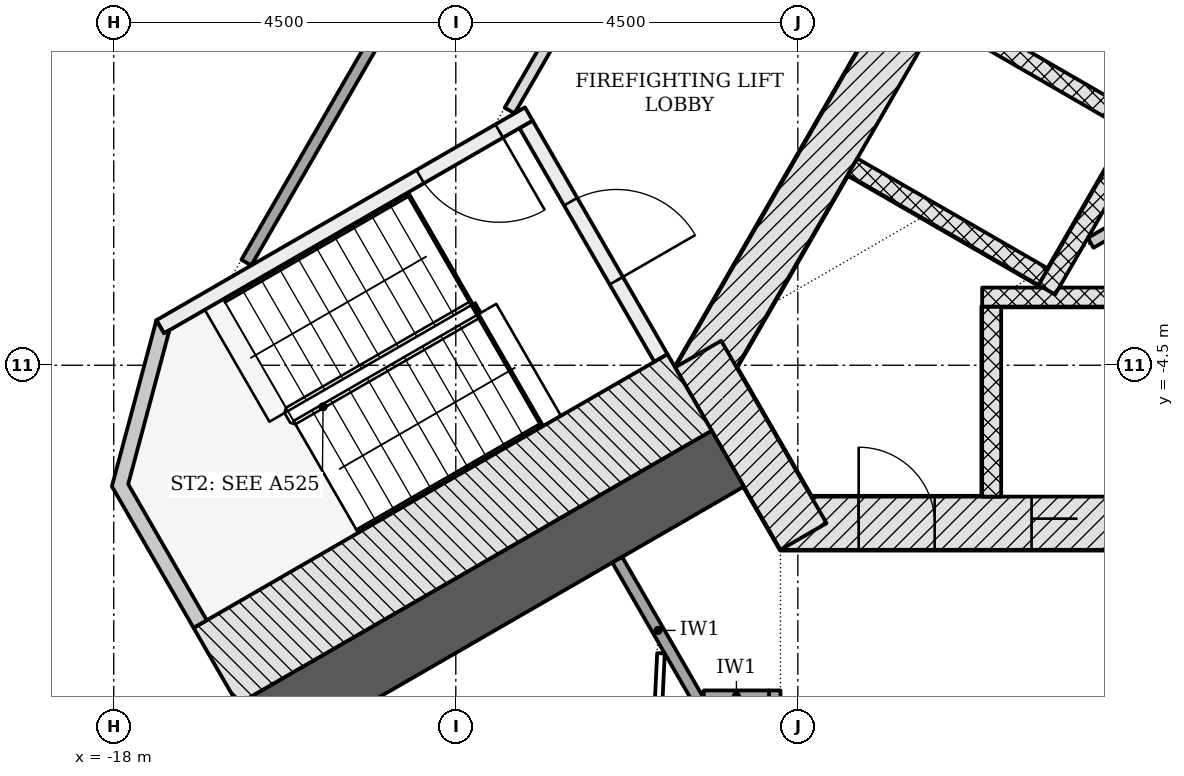
"""IFC4 building model, lengths in metres.
Left out: names, types, materials, properties, quantities, classifications, styles, units other than length and angle.
Written with IfcOpenShell. Run it as: python <this file> out.ifc"""

import sys

from ifc_helpers import new_model, si_unit, direction, frame, frame_2d, origin, place, context, subcontext, project, spatial, polyline, rectangle, outline, extrude, element, fill, save


model = new_model("IFC4")
c1 = context("Model", 3, precision=1e-05, world=origin(), true_north=direction((0.0, 1.0)))
c2 = subcontext(c1, "Body", "Model", "MODEL_VIEW")
j1 = project(units=[si_unit("LENGTHUNIT", "METRE"), si_unit("PLANEANGLEUNIT", "RADIAN")], contexts=[c1])
p1 = place(None, origin())
s1 = spatial("IfcSite", under=j1, at=p1, CompositionType="ELEMENT")
p2 = place(p1, origin())
s2 = spatial("IfcBuilding", under=s1, at=p2, CompositionType="ELEMENT")
p3 = place(p2, frame((0.0, 0.0, 72.6)))
s3 = spatial("IfcBuildingStorey", under=s2, at=p3, CompositionType="ELEMENT", Elevation=72.6)
p4 = place(p3, frame((-9.229, -6.578, -0.2), z_axis=(0.0, 0.0, 1.0), x_axis=(1.0, 0.0, 0.0)))
e1 = element("IfcWall", 1, at=p4, inside=s3, PredefinedType="SHEAR", context=c2, shape_type="SweptSolid", body=[
    extrude(rectangle(XDim=18.458, YDim=0.7, at=frame_2d((9.229, 0.0))), origin(), (0.0, 0.0, 1.0), 3.6),
])
p5 = place(p4, frame((3.304, 0.0, 0.2)))
e2 = element("IfcOpeningElement", 2, at=p5, cuts=e1, PredefinedType="OPENING", context=c2, shape_type="SweptSolid", body=[
    extrude(rectangle(XDim=1.1, YDim=2.1, at=frame_2d((0.55, 1.05))), frame((0.0, 0.36, 0.0), z_axis=(0.0, -1.0, 0.0), x_axis=(1.0, 0.0, 0.0)), (0.0, 0.0, 1.0), 0.72),
])
p6 = place(p4, frame((5.454, 0.0, 0.2)))
e3 = element("IfcOpeningElement", 3, at=p6, cuts=e1, PredefinedType="OPENING", context=c2, shape_type="SweptSolid", body=[
    extrude(rectangle(XDim=1.1, YDim=2.1, at=frame_2d((0.55, 1.05))), frame((0.0, 0.36, 0.0), z_axis=(0.0, -1.0, 0.0), x_axis=(1.0, 0.0, 0.0)), (0.0, 0.0, 1.0), 0.72),
])
p7 = place(p4, frame((7.604, 0.0, 0.2)))
e4 = element("IfcOpeningElement", 4, at=p7, cuts=e1, PredefinedType="OPENING", context=c2, shape_type="SweptSolid", body=[
    extrude(rectangle(XDim=1.1, YDim=2.1, at=frame_2d((0.55, 1.05))), frame((0.0, 0.36, 0.0), z_axis=(0.0, -1.0, 0.0), x_axis=(1.0, 0.0, 0.0)), (0.0, 0.0, 1.0), 0.72),
])
p8 = place(p4, frame((9.754, 0.0, 0.2)))
e5 = element("IfcOpeningElement", 5, at=p8, cuts=e1, PredefinedType="OPENING", context=c2, shape_type="SweptSolid", body=[
    extrude(rectangle(XDim=1.1, YDim=2.1, at=frame_2d((0.55, 1.05))), frame((0.0, 0.36, 0.0), z_axis=(0.0, -1.0, 0.0), x_axis=(1.0, 0.0, 0.0)), (0.0, 0.0, 1.0), 0.72),
])
p9 = place(p4, frame((11.904, 0.0, 0.2)))
e6 = element("IfcOpeningElement", 6, at=p9, cuts=e1, PredefinedType="OPENING", context=c2, shape_type="SweptSolid", body=[
    extrude(rectangle(XDim=1.1, YDim=2.1, at=frame_2d((0.55, 1.05))), frame((0.0, 0.36, 0.0), z_axis=(0.0, -1.0, 0.0), x_axis=(1.0, 0.0, 0.0)), (0.0, 0.0, 1.0), 0.72),
])
p10 = place(p4, frame((14.054, 0.0, 0.2)))
e7 = element("IfcOpeningElement", 7, at=p10, cuts=e1, PredefinedType="OPENING", context=c2, shape_type="SweptSolid", body=[
    extrude(rectangle(XDim=1.1, YDim=2.1, at=frame_2d((0.55, 1.05))), frame((0.0, 0.36, 0.0), z_axis=(0.0, -1.0, 0.0), x_axis=(1.0, 0.0, 0.0)), (0.0, 0.0, 1.0), 0.72),
])
p11 = place(p4, frame((1.029, 0.0, 0.2)))
e8 = element("IfcOpeningElement", 8, at=p11, cuts=e1, PredefinedType="OPENING", context=c2, shape_type="SweptSolid", body=[
    extrude(rectangle(XDim=1.0, YDim=2.1, at=frame_2d((0.5, 1.05))), frame((0.0, 0.36, 0.0), z_axis=(0.0, -1.0, 0.0), x_axis=(1.0, 0.0, 0.0)), (0.0, 0.0, 1.0), 0.72),
])
p12 = place(p3, frame((-1.083, 11.281, -0.2), z_axis=(0.0, 0.0, 1.0), x_axis=(-0.500001446645, -0.866024568562, 0.0)))
e9 = element("IfcWall", 9, at=p12, inside=s3, PredefinedType="SHEAR", context=c2, shape_type="SweptSolid", body=[
    extrude(rectangle(XDim=18.458, YDim=0.7, at=frame_2d((9.229, 0.0))), origin(), (0.0, 0.0, 1.0), 3.6),
])
p13 = place(p12, frame((8.979, 0.0, 0.2)))
e10 = element("IfcOpeningElement", 10, at=p13, cuts=e9, PredefinedType="OPENING", context=c2, shape_type="SweptSolid", body=[
    extrude(rectangle(XDim=1.2, YDim=2.1, at=frame_2d((0.6, 1.05))), frame((0.0, 0.36, 0.0), z_axis=(0.0, -1.0, 0.0), x_axis=(1.0, 0.0, 0.0)), (0.0, 0.0, 1.0), 0.72),
])
p14 = place(p12, frame((11.029, 0.0, 0.2)))
e11 = element("IfcOpeningElement", 11, at=p14, cuts=e9, PredefinedType="OPENING", context=c2, shape_type="SweptSolid", body=[
    extrude(rectangle(XDim=1.2, YDim=2.1, at=frame_2d((0.6, 1.05))), frame((0.0, 0.36, 0.0), z_axis=(0.0, -1.0, 0.0), x_axis=(1.0, 0.0, 0.0)), (0.0, 0.0, 1.0), 0.72),
])
p15 = place(p3, frame((-10.311, -4.353, -0.2), z_axis=(0.0, 0.0, 1.0), x_axis=(0.500042739161, -0.866000726912, 0.0)))
e12 = element("IfcWall", 12, at=p15, inside=s3, PredefinedType="SHEAR", context=c2, shape_type="SweptSolid", body=[
    extrude(rectangle(XDim=2.771, YDim=0.7, at=frame_2d((1.386, 0.0))), origin(), (0.0, 0.0, 1.0), 3.6),
])
p16 = place(p3, frame((-9.922, -5.728, -0.2), z_axis=(0.0, 0.0, 1.0), x_axis=(-0.866026077102, -0.499998833779, 0.0)))
e13 = element("IfcWall", 13, at=p16, inside=s3, PredefinedType="SHEAR", context=c2, shape_type="SweptSolid", body=[
    extrude(rectangle(XDim=13.381, YDim=0.85, at=frame_2d((6.691, 0.0))), origin(), (0.0, 0.0, 1.0), 3.6),
])
p17 = place(p3, frame((-6.45, -6.228, -0.2), z_axis=(0.0, 0.0, 1.0), x_axis=(0.0, 1.0, 0.0)))
e14 = element("IfcWall", 14, at=p17, inside=s3, PredefinedType="PARTITIONING", context=c2, shape_type="SweptSolid", body=[
    extrude(rectangle(XDim=2.5, YDim=0.25, at=frame_2d((1.25, 0.0))), origin(), (0.0, 0.0, 1.0), 3.6),
])
p18 = place(p3, frame((-6.575, -3.603, 0.0), z_axis=(0.0, 0.0, 1.0), x_axis=(1.0, 0.0, 0.0)))
e15 = element("IfcWall", 15, at=p18, inside=s3, PredefinedType="PARTITIONING", context=c2, shape_type="SweptSolid", body=[
    extrude(rectangle(XDim=13.15, YDim=0.25, at=frame_2d((6.575, 0.0))), origin(), (0.0, 0.0, 1.0), 3.4),
])
for number, where, z_axis, x_axis in (
    (16, (-7.106, 0.148, -0.2), (0.0, 0.0, 1.0), (0.866, -0.5, 0.0)),
    (17, (-8.281, -1.887, -0.2), (0.0, 0.0, 1.0), (0.866, -0.5, 0.0)),
):
    element("IfcWall", number, at=place(p3, frame(where, z_axis=z_axis, x_axis=x_axis)), inside=s3, PredefinedType="PARTITIONING", context=c2, shape_type="SweptSolid", body=[
        extrude(rectangle(XDim=2.9, YDim=0.25, at=frame_2d((1.45, 0.0))), origin(), (0.0, 0.0, 1.0), 3.6),
    ])
p19 = place(p3, frame((0.176, 6.711, 0.0), z_axis=(0.0, 0.0, 1.0), x_axis=(-0.500004227369, -0.866022963098, 0.0)))
e18 = element("IfcWall", 18, at=p19, inside=s3, PredefinedType="PARTITIONING", context=c2, shape_type="SweptSolid", body=[
    extrude(rectangle(XDim=11.8, YDim=0.25, at=frame_2d((5.9, 0.0))), origin(), (0.0, 0.0, 1.0), 3.4),
])
p20 = place(p3, frame((-5.148, -2.89, 0.0), z_axis=(0.0, 0.0, 1.0), x_axis=(0.866030081544, 0.499991897794, 0.0)))
e19 = element("IfcWall", 19, at=p20, inside=s3, PredefinedType="PARTITIONING", context=c2, shape_type="SweptSolid", body=[
    extrude(rectangle(XDim=12.131, YDim=0.15, at=frame_2d((6.065, 0.0))), origin(), (0.0, 0.0, 1.0), 3.4),
])
p21 = place(p20, frame((5.831, 0.0, 0.0)))
e20 = element("IfcOpeningElement", 20, at=p21, cuts=e19, PredefinedType="OPENING", context=c2, shape_type="SweptSolid", body=[
    extrude(rectangle(XDim=0.9, YDim=2.1, at=frame_2d((0.45, 1.05))), frame((0.0, 0.085, 0.0), z_axis=(0.0, -1.0, 0.0), x_axis=(1.0, 0.0, 0.0)), (0.0, 0.0, 1.0), 0.17),
])
p22 = place(p20, frame((1.467, 0.0, 0.0)))
e21 = element("IfcOpeningElement", 21, at=p22, cuts=e19, PredefinedType="OPENING", context=c2, shape_type="SweptSolid", body=[
    extrude(rectangle(XDim=0.9, YDim=2.1, at=frame_2d((0.45, 1.05))), frame((0.0, 0.085, 0.0), z_axis=(0.0, -1.0, 0.0), x_axis=(1.0, 0.0, 0.0)), (0.0, 0.0, 1.0), 0.17),
])
p23 = place(p3, frame((-12.576, -1.331, -0.2), z_axis=(0.0, 0.0, 1.0), x_axis=(0.499970499736, -0.8660424351, 0.0)))
e22 = element("IfcWall", 22, at=p23, inside=s3, PredefinedType="SHEAR", context=c2, shape_type="SweptSolid", body=[
    extrude(rectangle(XDim=3.55, YDim=0.2, at=frame_2d((1.775, 0.0))), origin(), (0.0, 0.0, 1.0), 3.6),
])
p24 = place(p23, frame((1.175, 0.0, 0.2)))
e23 = element("IfcOpeningElement", 23, at=p24, cuts=e22, PredefinedType="OPENING", context=c2, shape_type="SweptSolid", body=[
    extrude(rectangle(XDim=1.2, YDim=2.1, at=frame_2d((0.6, 1.05))), frame((0.0, 0.11, 0.0), z_axis=(0.0, -1.0, 0.0), x_axis=(1.0, 0.0, 0.0)), (0.0, 0.0, 1.0), 0.22),
])
p25 = place(p3, frame((-12.539, -1.194, -0.2), z_axis=(0.0, 0.0, 1.0), x_axis=(-0.866045472092, -0.499965239061, 0.0)))
e24 = element("IfcWall", 24, at=p25, inside=s3, PredefinedType="SHEAR", context=c2, shape_type="SweptSolid", body=[
    extrude(rectangle(XDim=5.6, YDim=0.2, at=frame_2d((2.8, 0.0))), origin(), (0.0, 0.0, 1.0), 3.6),
])
p26 = place(p25, frame((0.45, 0.0, 0.2)))
e25 = element("IfcOpeningElement", 25, at=p26, cuts=e24, PredefinedType="OPENING", context=c2, shape_type="SweptSolid", body=[
    extrude(rectangle(XDim=1.2, YDim=2.1, at=frame_2d((0.6, 1.05))), frame((0.0, 0.11, 0.0), z_axis=(0.0, -1.0, 0.0), x_axis=(1.0, 0.0, 0.0)), (0.0, 0.0, 1.0), 0.22),
])
p27 = place(p3, frame((-10.424, -4.858, -0.2), z_axis=(0.0, 0.0, 1.0), x_axis=(-0.866033125095, -0.499986626058, 0.0)))
e26 = element("IfcWall", 26, at=p27, inside=s3, PredefinedType="SHEAR", context=c2, shape_type="SweptSolid", body=[
    extrude(rectangle(XDim=7.2, YDim=1.161, at=frame_2d((3.6, 0.0))), origin(), (0.0, 0.0, 1.0), 3.6),
])
p28 = place(p3, frame((0.0, 0.0, -0.2)))
e27 = element("IfcWall", 27, at=p28, inside=s3, PredefinedType="SHEAR", context=c2, shape_type="SweptSolid", body=[
    extrude(outline(polyline([(-17.439, -3.907), (-18.025, -6.093), (-16.95, -7.955), (-16.777, -7.855), (-17.81, -6.065), (-17.267, -4.039), (-17.339, -4.081), (-17.339, -4.081), (-17.339, -4.081), (-17.339, -4.081), (-17.339, -4.081), (-17.339, -4.081), (-17.339, -4.081), (-17.339, -4.081), (-17.339, -4.081), (-17.339, -4.081), (-17.339, -4.081), (-17.339, -4.081), (-17.339, -4.081), (-17.339, -4.081), (-17.339, -4.081), (-17.339, -4.081), (-17.339, -4.081), (-17.439, -3.907)])), origin(), (0.0, 0.0, 1.0), 3.6),
])
p29 = place(p3, frame((-16.256, -3.149, 0.0), z_axis=(0.0, 0.0, 1.0), x_axis=(0.499999683919, 0.866025586274, 0.0)))
e28 = element("IfcWall", 28, at=p29, inside=s3, PredefinedType="PARTITIONING", context=c2, shape_type="SweptSolid", body=[
    extrude(rectangle(XDim=22.234, YDim=0.15, at=frame_2d((11.117, 0.0))), origin(), (0.0, 0.0, 1.0), 2.778),
])
p30 = place(p29, frame((13.551, 0.0, 0.0)))
e29 = element("IfcOpeningElement", 29, at=p30, cuts=e28, PredefinedType="OPENING", context=c2, shape_type="SweptSolid", body=[
    extrude(rectangle(XDim=1.0, YDim=2.1, at=frame_2d((0.5, 1.05))), frame((0.0, 0.085, 0.0), z_axis=(0.0, -1.0, 0.0), x_axis=(1.0, 0.0, 0.0)), (0.0, 0.0, 1.0), 0.17),
])
p31 = place(p29, frame((5.647, 0.0, 0.0)))
e30 = element("IfcOpeningElement", 30, at=p31, cuts=e28, PredefinedType="OPENING", context=c2, shape_type="SweptSolid", body=[
    extrude(rectangle(XDim=1.5, YDim=2.1, at=frame_2d((0.75, 1.05))), frame((0.0, 0.085, 0.0), z_axis=(0.0, -1.0, 0.0), x_axis=(1.0, 0.0, 0.0)), (0.0, 0.0, 1.0), 0.17),
])
p32 = place(p3, frame((-4.407, 13.374, 0.0), z_axis=(0.0, 0.0, 1.0), x_axis=(-0.499997181693, -0.866027030928, 0.0)))
e31 = element("IfcWall", 31, at=p32, inside=s3, PredefinedType="PARTITIONING", context=c2, shape_type="SweptSolid", body=[
    extrude(rectangle(XDim=16.77, YDim=0.15, at=frame_2d((8.385, 0.0))), origin(), (0.0, 0.0, 1.0), 2.778),
])
p33 = place(p32, frame((8.879, 0.0, 0.0)))
e32 = element("IfcOpeningElement", 32, at=p33, cuts=e31, PredefinedType="OPENING", context=c2, shape_type="SweptSolid", body=[
    extrude(rectangle(XDim=1.0, YDim=2.1, at=frame_2d((0.5, 1.05))), frame((0.0, 0.085, 0.0), z_axis=(0.0, -1.0, 0.0), x_axis=(1.0, 0.0, 0.0)), (0.0, 0.0, 1.0), 0.17),
])
p34 = place(p3, frame((-11.376, -7.059, 0.0), z_axis=(0.0, 0.0, 1.0), x_axis=(0.500076779081, -0.865981070823, 0.0)))
e33 = element("IfcWall", 33, at=p34, inside=s3, PredefinedType="PARTITIONING", context=c2, shape_type="SweptSolid", body=[
    extrude(rectangle(XDim=2.147, YDim=0.15, at=frame_2d((1.074, 0.0))), origin(), (0.0, 0.0, 1.0), 2.778),
])
p35 = place(p3, frame((-9.304, -10.428, 0.0), z_axis=(0.0, 0.0, 1.0), x_axis=(0.0, 1.0, 0.0)))
e34 = element("IfcWall", 34, at=p35, inside=s3, PredefinedType="PARTITIONING", context=c2, shape_type="SweptSolid", body=[
    extrude(rectangle(XDim=1.65, YDim=0.15, at=frame_2d((0.825, 0.0))), origin(), (0.0, 0.0, 1.0), 3.4),
])
p36 = place(p3, frame((-10.238, -8.853, 0.0), z_axis=(0.0, 0.0, 1.0), x_axis=(1.0, 0.0, 0.0)))
e35 = element("IfcWall", 35, at=p36, inside=s3, PredefinedType="PARTITIONING", context=c2, shape_type="SweptSolid", body=[
    extrude(rectangle(XDim=0.859, YDim=0.15, at=frame_2d((0.43, 0.0))), origin(), (0.0, 0.0, 1.0), 3.4),
])
p37 = place(p3, frame((-11.207, -16.709, 0.0), z_axis=(0.0, 0.0, 1.0), x_axis=(0.048196786961, 0.998837859578, 0.0)))
e36 = element("IfcWall", 36, at=p37, inside=s3, PredefinedType="PARTITIONING", context=c2, shape_type="SweptSolid", body=[
    extrude(rectangle(XDim=8.429, YDim=0.1, at=frame_2d((4.214, 0.0))), origin(), (0.0, 0.0, 1.0), 2.778),
])
p38 = place(p37, frame((5.868, 0.0, 0.0)))
e37 = element("IfcOpeningElement", 37, at=p38, cuts=e36, PredefinedType="OPENING", context=c2, shape_type="SweptSolid", body=[
    extrude(rectangle(XDim=1.0, YDim=2.1, at=frame_2d((0.5, 1.05))), frame((0.0, 0.06, 0.0), z_axis=(0.0, -1.0, 0.0), x_axis=(1.0, 0.0, 0.0)), (0.0, 0.0, 1.0), 0.12),
])
p39 = place(p37, frame((1.635, 0.0, 0.0)))
e38 = element("IfcOpeningElement", 38, at=p39, cuts=e36, PredefinedType="OPENING", context=c2, shape_type="SweptSolid", body=[
    extrude(rectangle(XDim=1.0, YDim=2.1, at=frame_2d((0.5, 1.05))), frame((0.0, 0.06, 0.0), z_axis=(0.0, -1.0, 0.0), x_axis=(1.0, 0.0, 0.0)), (0.0, 0.0, 1.0), 0.12),
])
p40 = place(p5, origin())
e39 = element("IfcDoor", 39, at=p40, inside=s3, OperationType="DOUBLE_DOOR_SLIDING", PredefinedType="DOOR", context=c2, shape_type="SweptSolid", body=[
    extrude(rectangle(XDim=1.1, YDim=2.1, at=frame_2d((0.55, 1.05))), frame((0.0, 0.025, 0.0), z_axis=(0.0, -1.0, 0.0), x_axis=(1.0, 0.0, 0.0)), (0.0, 0.0, 1.0), 0.05),
])
fill(e2, e39)
p41 = place(p11, origin())
e40 = element("IfcDoor", 40, at=p41, inside=s3, OperationType="SINGLE_SWING_LEFT", PredefinedType="DOOR", context=c2, shape_type="SweptSolid", body=[
    extrude(rectangle(XDim=1.0, YDim=2.1, at=frame_2d((0.5, 1.05))), frame((0.0, 0.075, 0.0), z_axis=(0.0, -1.0, 0.0), x_axis=(1.0, 0.0, 0.0)), (0.0, 0.0, 1.0), 0.15),
])
fill(e8, e40)
p42 = place(p24, origin())
e41 = element("IfcDoor", 41, at=p42, inside=s3, OperationType="SINGLE_SWING_RIGHT", PredefinedType="DOOR", context=c2, shape_type="SweptSolid", body=[
    extrude(rectangle(XDim=1.2, YDim=2.1, at=frame_2d((0.6, 1.05))), frame((0.0, 0.025, 0.0), z_axis=(0.0, -1.0, 0.0), x_axis=(1.0, 0.0, 0.0)), (0.0, 0.0, 1.0), 0.05),
])
fill(e23, e41)
p43 = place(p26, origin())
e42 = element("IfcDoor", 42, at=p43, inside=s3, OperationType="SINGLE_SWING_LEFT", PredefinedType="DOOR", context=c2, shape_type="SweptSolid", body=[
    extrude(rectangle(XDim=1.2, YDim=2.1, at=frame_2d((0.6, 1.05))), frame((0.0, 0.025, 0.0), z_axis=(0.0, -1.0, 0.0), x_axis=(1.0, 0.0, 0.0)), (0.0, 0.0, 1.0), 0.05),
])
fill(e25, e42)
save(model, sys.argv[1])
